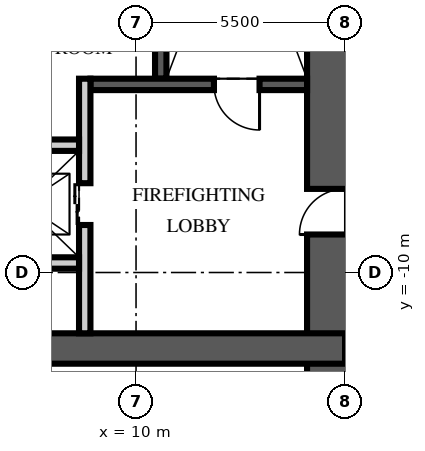
"""IFC4 building model, lengths in metres.
Left out: names, types, materials, properties, quantities, classifications, styles, units other than length and angle.
Written with IfcOpenShell. Run it as: python <this file> out.ifc"""

import sys

from ifc_helpers import new_model, si_unit, direction, frame, frame_2d, origin, place, context, subcontext, project, spatial, rectangle, extrude, element, fill, save


model = new_model("IFC4")
c1 = context("Model", 3, precision=1e-05, world=origin(), true_north=direction((0.0, 1.0)))
c2 = subcontext(c1, "Body", "Model", "MODEL_VIEW")
j1 = project(units=[si_unit("LENGTHUNIT", "METRE"), si_unit("PLANEANGLEUNIT", "RADIAN")], contexts=[c1])
p1 = place(None, origin())
s1 = spatial("IfcSite", under=j1, at=p1, CompositionType="ELEMENT")
p2 = place(p1, origin())
s2 = spatial("IfcBuilding", under=s1, at=p2, CompositionType="ELEMENT")
p3 = place(p2, frame((0.0, 0.0, 178.5)))
s3 = spatial("IfcBuildingStorey", under=s2, at=p3, CompositionType="ELEMENT", Elevation=178.5)
p4 = place(p3, frame((15.5, -15.5, -0.25), z_axis=(0.0, 0.0, 1.0), x_axis=(0.0, 1.0, 0.0)))
e1 = element("IfcWall", 1, at=p4, inside=s3, PredefinedType="SHEAR", context=c2, shape_type="SweptSolid", body=[
    extrude(rectangle(XDim=31.0, YDim=2.0, at=frame_2d((15.5, 0.0))), origin(), (0.0, 0.0, 1.0), 3.75),
])
p5 = place(p4, frame((6.5, 0.0, 0.25)))
e2 = element("IfcOpeningElement", 2, at=p5, cuts=e1, PredefinedType="OPENING", context=c2, shape_type="SweptSolid", body=[
    extrude(rectangle(XDim=1.2, YDim=2.1, at=frame_2d((0.6, 1.05))), frame((0.0, 1.01, 0.0), z_axis=(0.0, -1.0, 0.0), x_axis=(1.0, 0.0, 0.0)), (0.0, 0.0, 1.0), 2.02),
])
p6 = place(p4, frame((23.0, 0.0, 0.25)))
e3 = element("IfcOpeningElement", 3, at=p6, cuts=e1, PredefinedType="OPENING", context=c2, shape_type="SweptSolid", body=[
    extrude(rectangle(XDim=1.8, YDim=2.1, at=frame_2d((0.9, 1.05))), frame((0.0, 1.01, 0.0), z_axis=(0.0, -1.0, 0.0), x_axis=(1.0, 0.0, 0.0)), (0.0, 0.0, 1.0), 2.02),
])
p7 = place(p3, frame((-15.5, -12.0, -0.25), z_axis=(0.0, 0.0, 1.0), x_axis=(1.0, 0.0, 0.0)))
e4 = element("IfcWall", 4, at=p7, inside=s3, PredefinedType="SHEAR", context=c2, shape_type="SweptSolid", body=[
    extrude(rectangle(XDim=31.0, YDim=0.8, at=frame_2d((15.5, 0.0))), origin(), (0.0, 0.0, 1.0), 3.75),
])
p8 = place(p3, frame((10.65, -4.9, 0.0), z_axis=(0.0, 0.0, 1.0), x_axis=(0.0, 1.0, 0.0)))
e5 = element("IfcWall", 5, at=p8, inside=s3, PredefinedType="SOLIDWALL", context=c2, shape_type="SweptSolid", body=[
    extrude(rectangle(XDim=10.1, YDim=0.3, at=frame_2d((5.05, 0.0))), origin(), (0.0, 0.0, 1.0), 3.5),
])
p9 = place(p3, frame((14.5, -5.05, 0.0), z_axis=(0.0, 0.0, 1.0), x_axis=(-1.0, 0.0, 0.0)))
e6 = element("IfcWall", 6, at=p9, inside=s3, PredefinedType="SOLIDWALL", context=c2, shape_type="SweptSolid", body=[
    extrude(rectangle(XDim=5.7, YDim=0.3, at=frame_2d((2.85, 0.0))), origin(), (0.0, 0.0, 1.0), 3.5),
])
p10 = place(p9, frame((1.25, 0.0, 0.0)))
e7 = element("IfcOpeningElement", 7, at=p10, cuts=e6, PredefinedType="OPENING", context=c2, shape_type="SweptSolid", body=[
    extrude(rectangle(XDim=1.2, YDim=2.1, at=frame_2d((0.6, 1.05))), frame((0.0, 0.16, 0.0), z_axis=(0.0, -1.0, 0.0), x_axis=(1.0, 0.0, 0.0)), (0.0, 0.0, 1.0), 0.32),
])
p11 = place(p3, frame((8.65, -11.6, 0.0), z_axis=(0.0, 0.0, 1.0), x_axis=(0.0, 1.0, 0.0)))
e8 = element("IfcWall", 8, at=p11, inside=s3, PredefinedType="PARTITIONING", context=c2, shape_type="SweptSolid", body=[
    extrude(rectangle(XDim=6.7, YDim=0.3, at=frame_2d((3.35, 0.0))), origin(), (0.0, 0.0, 1.0), 3.5),
])
p12 = place(p11, frame((2.85, 0.0, 0.0)))
e9 = element("IfcOpeningElement", 9, at=p12, cuts=e8, PredefinedType="OPENING", context=c2, shape_type="SweptSolid", body=[
    extrude(rectangle(XDim=1.1, YDim=2.1, at=frame_2d((0.55, 1.05))), frame((0.0, 0.16, 0.0), z_axis=(0.0, -1.0, 0.0), x_axis=(1.0, 0.0, 0.0)), (0.0, 0.0, 1.0), 0.32),
])
p13 = place(p3, frame((-8.5, -6.65, 0.0), z_axis=(0.0, 0.0, 1.0), x_axis=(1.0, 0.0, 0.0)))
e10 = element("IfcWall", 10, at=p13, inside=s3, PredefinedType="PARTITIONING", context=c2, shape_type="SweptSolid", body=[
    extrude(rectangle(XDim=17.0, YDim=0.3, at=frame_2d((8.5, 0.0))), origin(), (0.0, 0.0, 1.0), 3.5),
])
p14 = place(p13, frame((7.8, 0.0, 0.0)))
e11 = element("IfcOpeningElement", 11, at=p14, cuts=e10, PredefinedType="OPENING", context=c2, shape_type="SweptSolid", body=[
    extrude(rectangle(XDim=1.3, YDim=2.4, at=frame_2d((0.65, 1.2))), frame((0.0, 0.16, 0.0), z_axis=(0.0, -1.0, 0.0), x_axis=(1.0, 0.0, 0.0)), (0.0, 0.0, 1.0), 0.32),
])
p15 = place(p13, frame((5.65, 0.0, 0.0)))
e12 = element("IfcOpeningElement", 12, at=p15, cuts=e10, PredefinedType="OPENING", context=c2, shape_type="SweptSolid", body=[
    extrude(rectangle(XDim=0.9, YDim=2.1, at=frame_2d((0.45, 1.05))), frame((0.0, 0.16, 0.0), z_axis=(0.0, -1.0, 0.0), x_axis=(1.0, 0.0, 0.0)), (0.0, 0.0, 1.0), 0.32),
])
p16 = place(p13, frame((10.4, 0.0, 0.0)))
e13 = element("IfcOpeningElement", 13, at=p16, cuts=e10, PredefinedType="OPENING", context=c2, shape_type="SweptSolid", body=[
    extrude(rectangle(XDim=0.9, YDim=2.1, at=frame_2d((0.45, 1.05))), frame((0.0, 0.16, 0.0), z_axis=(0.0, -1.0, 0.0), x_axis=(1.0, 0.0, 0.0)), (0.0, 0.0, 1.0), 0.32),
])
p17 = place(p3, frame((5.6, -9.75, 0.0), z_axis=(0.0, 0.0, 1.0), x_axis=(1.0, 0.0, 0.0)))
e14 = element("IfcWall", 14, at=p17, inside=s3, PredefinedType="PARTITIONING", context=c2, shape_type="SweptSolid", body=[
    extrude(rectangle(XDim=2.9, YDim=0.3, at=frame_2d((1.45, 0.0))), origin(), (0.0, 0.0, 1.0), 3.5),
])
p18 = place(p10, origin())
e15 = element("IfcDoor", 15, at=p18, inside=s3, OperationType="SINGLE_SWING_LEFT", PredefinedType="DOOR", context=c2, shape_type="SweptSolid", body=[
    extrude(rectangle(XDim=1.2, YDim=2.1, at=frame_2d((0.6, 1.05))), frame((0.0, 0.025, 0.0), z_axis=(0.0, -1.0, 0.0), x_axis=(1.0, 0.0, 0.0)), (0.0, 0.0, 1.0), 0.05),
])
fill(e7, e15)
p19 = place(p5, origin())
e16 = element("IfcDoor", 16, at=p19, inside=s3, OperationType="SINGLE_SWING_LEFT", PredefinedType="DOOR", context=c2, shape_type="SweptSolid", body=[
    extrude(rectangle(XDim=1.2, YDim=2.1, at=frame_2d((0.6, 1.05))), frame((0.0, 0.025, 0.0), z_axis=(0.0, -1.0, 0.0), x_axis=(1.0, 0.0, 0.0)), (0.0, 0.0, 1.0), 0.05),
])
fill(e2, e16)
p20 = place(p12, origin())
e17 = element("IfcDoor", 17, at=p20, inside=s3, OperationType="DOUBLE_DOOR_SLIDING", PredefinedType="DOOR", context=c2, shape_type="SweptSolid", body=[
    extrude(rectangle(XDim=1.1, YDim=2.1, at=frame_2d((0.55, 1.05))), frame((0.0, 0.025, 0.0), z_axis=(0.0, -1.0, 0.0), x_axis=(1.0, 0.0, 0.0)), (0.0, 0.0, 1.0), 0.05),
])
fill(e9, e17)
save(model, sys.argv[1])
